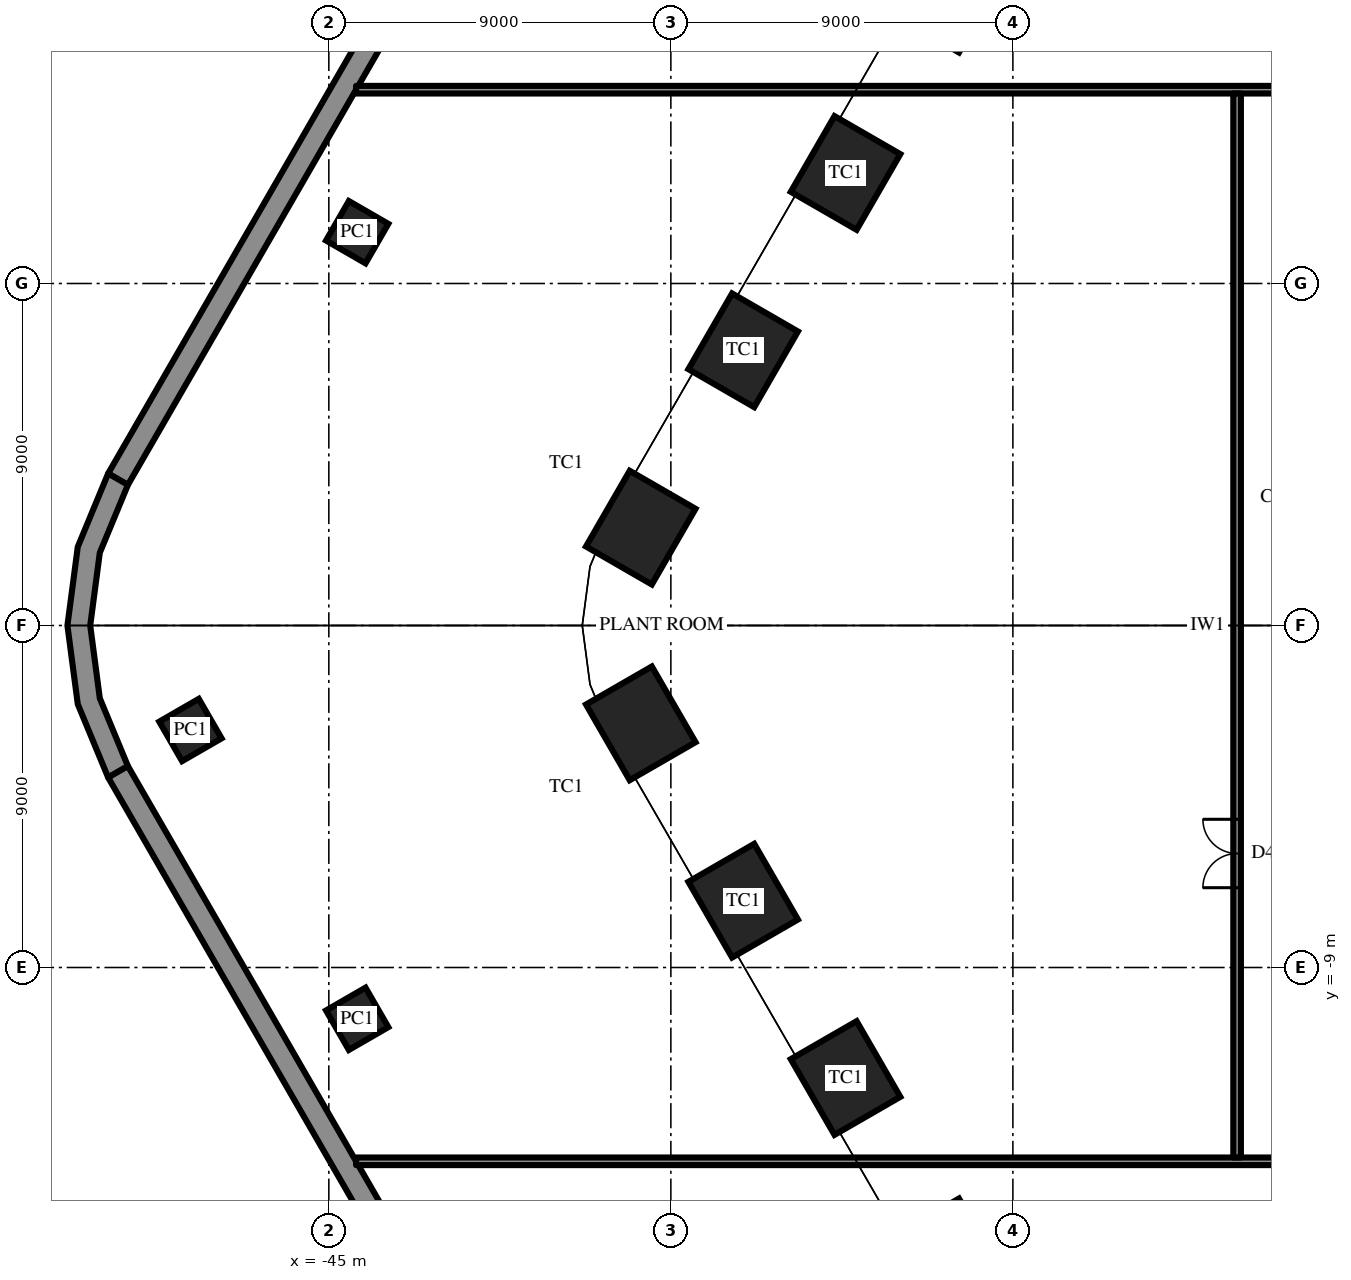
"""IFC4 building model, lengths in metres.
Left out: names, types, materials, properties, quantities, classifications, styles, units other than length and angle.
Written with IfcOpenShell. Run it as: python <this file> out.ifc"""

import sys

from ifc_helpers import new_model, si_unit, direction, frame, frame_2d, origin, origin_2d, place, context, subcontext, project, spatial, polyline, rectangle, outline, extrude, element, fill, save


model = new_model("IFC4")
c1 = context("Model", 3, precision=1e-05, world=origin(), true_north=direction((0.0, 1.0)))
c2 = subcontext(c1, "Body", "Model", "MODEL_VIEW")
j1 = project(units=[si_unit("LENGTHUNIT", "METRE"), si_unit("PLANEANGLEUNIT", "RADIAN")], contexts=[c1])
p1 = place(None, origin())
s1 = spatial("IfcSite", under=j1, at=p1, CompositionType="ELEMENT")
p2 = place(p1, origin())
s2 = spatial("IfcBuilding", under=s1, at=p2, CompositionType="ELEMENT")
p3 = place(p2, frame((0.0, 0.0, -4.5)))
s3 = spatial("IfcBuildingStorey", under=s2, at=p3, CompositionType="ELEMENT", Elevation=-4.5)
for number, where, z_axis, x_axis in (
    (1, (-28.709, 16.575, 0.0), (0.0, 0.0, 1.0), (-0.5, -0.866, 0.0)),
    (2, (-31.403, 11.908, 0.0), (0.0, 0.0, 1.0), (-0.5, -0.866, 0.0)),
    (3, (-34.097, 7.242, 0.0), (0.0, 0.0, 1.0), (-0.5, -0.866, 0.0)),
    (4, (-36.792, 2.575, 0.0), (0.0, 0.0, 1.0), (-0.5, -0.866, 0.0)),
    (5, (-36.792, -2.575, 0.0), (0.0, 0.0, 1.0), (0.5, -0.866, 0.0)),
    (6, (-34.097, -7.242, 0.0), (0.0, 0.0, 1.0), (0.5, -0.866, 0.0)),
    (7, (-31.403, -11.908, 0.0), (0.0, 0.0, 1.0), (0.5, -0.866, 0.0)),
    (8, (-28.709, -16.575, 0.0), (0.0, 0.0, 1.0), (0.5, -0.866, 0.0)),
):
    element("IfcColumn", number, at=place(p3, frame(where, z_axis=z_axis, x_axis=x_axis)), inside=s3, PredefinedType="COLUMN", context=c2, shape_type="SweptSolid", body=[
        extrude(rectangle(XDim=2.3, YDim=2.0, at=origin_2d()), origin(), (0.0, 0.0, 1.0), 4.5),
    ])
for number, where, z_axis, x_axis in (
    (9, (-44.254, 10.35, 0.0), (0.0, 0.0, 1.0), (-0.5, -0.866, 0.0)),
    (10, (-48.642, -2.75, 0.0), (0.0, 0.0, 1.0), (0.5, -0.866, 0.0)),
    (11, (-44.254, -10.35, 0.0), (0.0, 0.0, 1.0), (0.5, -0.866, 0.0)),
):
    element("IfcColumn", number, at=place(p3, frame(where, z_axis=z_axis, x_axis=x_axis)), inside=s3, PredefinedType="COLUMN", context=c2, shape_type="SweptSolid", body=[
        extrude(rectangle(XDim=1.2, YDim=1.2, at=origin_2d()), origin(), (0.0, 0.0, 1.0), 4.5),
    ])
p4 = place(p3, frame((-28.608, 41.85, 0.0), z_axis=(0.0, 0.0, 1.0), x_axis=(-0.500002442456, -0.866023993627, 0.0)))
e12 = element("IfcWall", 12, at=p4, inside=s3, PredefinedType="SOLIDWALL", context=c2, shape_type="SweptSolid", body=[
    extrude(rectangle(XDim=43.879, YDim=0.6, at=frame_2d((21.939, 0.0))), origin(), (0.0, 0.0, 1.0), 4.5),
])
p5 = place(p3, origin())
e13 = element("IfcWall", 13, at=p5, inside=s3, PredefinedType="SOLIDWALL", context=c2, shape_type="SweptSolid", body=[
    extrude(outline(polyline([(-50.807, 4.0), (-51.606, 2.071), (-51.879, 0.0), (-51.606, -2.071), (-50.807, -4.0), (-50.287, -3.7), (-51.026, -1.915), (-51.279, 0.0), (-51.026, 1.915), (-50.287, 3.7), (-50.807, 4.0)])), origin(), (0.0, 0.0, 1.0), 4.5),
])
p6 = place(p3, frame((-50.547, -3.85, 0.0), z_axis=(0.0, 0.0, 1.0), x_axis=(0.500002442456, -0.866023993627, 0.0)))
e14 = element("IfcWall", 14, at=p6, inside=s3, PredefinedType="SOLIDWALL", context=c2, shape_type="SweptSolid", body=[
    extrude(rectangle(XDim=43.879, YDim=0.6, at=frame_2d((21.939, 0.0))), origin(), (0.0, 0.0, 1.0), 4.5),
])
p7 = place(p3, frame((-44.283, 14.1, 0.0), z_axis=(0.0, 0.0, 1.0), x_axis=(1.0, 0.0, 0.0)))
e15 = element("IfcWall", 15, at=p7, inside=s3, PredefinedType="PARTITIONING", context=c2, shape_type="SweptSolid", body=[
    extrude(rectangle(XDim=88.565, YDim=0.2, at=frame_2d((44.283, 0.0))), origin(), (0.0, 0.0, 1.0), 4.15),
])
p8 = place(p7, frame((38.383, 0.0, 0.0)))
e16 = element("IfcOpeningElement", 16, at=p8, cuts=e15, PredefinedType="OPENING", context=c2, shape_type="SweptSolid", body=[
    extrude(rectangle(XDim=1.8, YDim=2.4, at=frame_2d((0.9, 1.2))), frame((0.0, 0.11, 0.0), z_axis=(0.0, -1.0, 0.0), x_axis=(1.0, 0.0, 0.0)), (0.0, 0.0, 1.0), 0.22),
])
p9 = place(p7, frame((55.783, 0.0, 0.0)))
e17 = element("IfcOpeningElement", 17, at=p9, cuts=e15, PredefinedType="OPENING", context=c2, shape_type="SweptSolid", body=[
    extrude(rectangle(XDim=1.0, YDim=2.2, at=frame_2d((0.5, 1.1))), frame((0.0, 0.11, 0.0), z_axis=(0.0, -1.0, 0.0), x_axis=(1.0, 0.0, 0.0)), (0.0, 0.0, 1.0), 0.22),
])
p10 = place(p7, frame((46.083, 0.0, 0.0)))
e18 = element("IfcOpeningElement", 18, at=p10, cuts=e15, PredefinedType="OPENING", context=c2, shape_type="SweptSolid", body=[
    extrude(rectangle(XDim=1.8, YDim=2.4, at=frame_2d((0.9, 1.2))), frame((0.0, 0.11, 0.0), z_axis=(0.0, -1.0, 0.0), x_axis=(1.0, 0.0, 0.0)), (0.0, 0.0, 1.0), 0.22),
])
p11 = place(p7, frame((63.633, 0.0, 0.0)))
e19 = element("IfcOpeningElement", 19, at=p11, cuts=e15, PredefinedType="OPENING", context=c2, shape_type="SweptSolid", body=[
    extrude(rectangle(XDim=1.0, YDim=2.2, at=frame_2d((0.5, 1.1))), frame((0.0, 0.11, 0.0), z_axis=(0.0, -1.0, 0.0), x_axis=(1.0, 0.0, 0.0)), (0.0, 0.0, 1.0), 0.22),
])
p12 = place(p3, frame((-44.283, -14.1, 0.0), z_axis=(0.0, 0.0, 1.0), x_axis=(1.0, 0.0, 0.0)))
e20 = element("IfcWall", 20, at=p12, inside=s3, PredefinedType="PARTITIONING", context=c2, shape_type="SweptSolid", body=[
    extrude(rectangle(XDim=88.565, YDim=0.2, at=frame_2d((44.283, 0.0))), origin(), (0.0, 0.0, 1.0), 4.15),
])
p13 = place(p12, frame((31.383, 0.0, 0.0)))
e21 = element("IfcOpeningElement", 21, at=p13, cuts=e20, PredefinedType="OPENING", context=c2, shape_type="SweptSolid", body=[
    extrude(rectangle(XDim=1.8, YDim=2.4, at=frame_2d((0.9, 1.2))), frame((0.0, 0.11, 0.0), z_axis=(0.0, -1.0, 0.0), x_axis=(1.0, 0.0, 0.0)), (0.0, 0.0, 1.0), 0.22),
])
p14 = place(p12, frame((50.283, 0.0, 0.0)))
e22 = element("IfcOpeningElement", 22, at=p14, cuts=e20, PredefinedType="OPENING", context=c2, shape_type="SweptSolid", body=[
    extrude(rectangle(XDim=1.0, YDim=2.2, at=frame_2d((0.5, 1.1))), frame((0.0, 0.11, 0.0), z_axis=(0.0, -1.0, 0.0), x_axis=(1.0, 0.0, 0.0)), (0.0, 0.0, 1.0), 0.22),
])
p15 = place(p12, frame((46.083, 0.0, 0.0)))
e23 = element("IfcOpeningElement", 23, at=p15, cuts=e20, PredefinedType="OPENING", context=c2, shape_type="SweptSolid", body=[
    extrude(rectangle(XDim=1.8, YDim=2.4, at=frame_2d((0.9, 1.2))), frame((0.0, 0.11, 0.0), z_axis=(0.0, -1.0, 0.0), x_axis=(1.0, 0.0, 0.0)), (0.0, 0.0, 1.0), 0.22),
])
p16 = place(p12, frame((63.633, 0.0, 0.0)))
e24 = element("IfcOpeningElement", 24, at=p16, cuts=e20, PredefinedType="OPENING", context=c2, shape_type="SweptSolid", body=[
    extrude(rectangle(XDim=1.0, YDim=2.2, at=frame_2d((0.5, 1.1))), frame((0.0, 0.11, 0.0), z_axis=(0.0, -1.0, 0.0), x_axis=(1.0, 0.0, 0.0)), (0.0, 0.0, 1.0), 0.22),
])
p17 = place(p3, frame((-21.1, -14.0, 0.0), z_axis=(0.0, 0.0, 1.0), x_axis=(0.0, 1.0, 0.0)))
e25 = element("IfcWall", 25, at=p17, inside=s3, PredefinedType="PARTITIONING", context=c2, shape_type="SweptSolid", body=[
    extrude(rectangle(XDim=28.0, YDim=0.2, at=frame_2d((14.0, 0.0))), origin(), (0.0, 0.0, 1.0), 4.15),
])
p18 = place(p17, frame((7.1, 0.0, 0.0)))
e26 = element("IfcOpeningElement", 26, at=p18, cuts=e25, PredefinedType="OPENING", context=c2, shape_type="SweptSolid", body=[
    extrude(rectangle(XDim=1.8, YDim=2.4, at=frame_2d((0.9, 1.2))), frame((0.0, 0.11, 0.0), z_axis=(0.0, -1.0, 0.0), x_axis=(1.0, 0.0, 0.0)), (0.0, 0.0, 1.0), 0.22),
])
p19 = place(p18, origin())
e27 = element("IfcDoor", 27, at=p19, inside=s3, OperationType="DOUBLE_DOOR_SINGLE_SWING", PredefinedType="DOOR", context=c2, shape_type="SweptSolid", body=[
    extrude(rectangle(XDim=1.8, YDim=2.4, at=frame_2d((0.9, 1.2))), frame((0.0, 0.025, 0.0), z_axis=(0.0, -1.0, 0.0), x_axis=(1.0, 0.0, 0.0)), (0.0, 0.0, 1.0), 0.05),
])
fill(e26, e27)
save(model, sys.argv[1])
